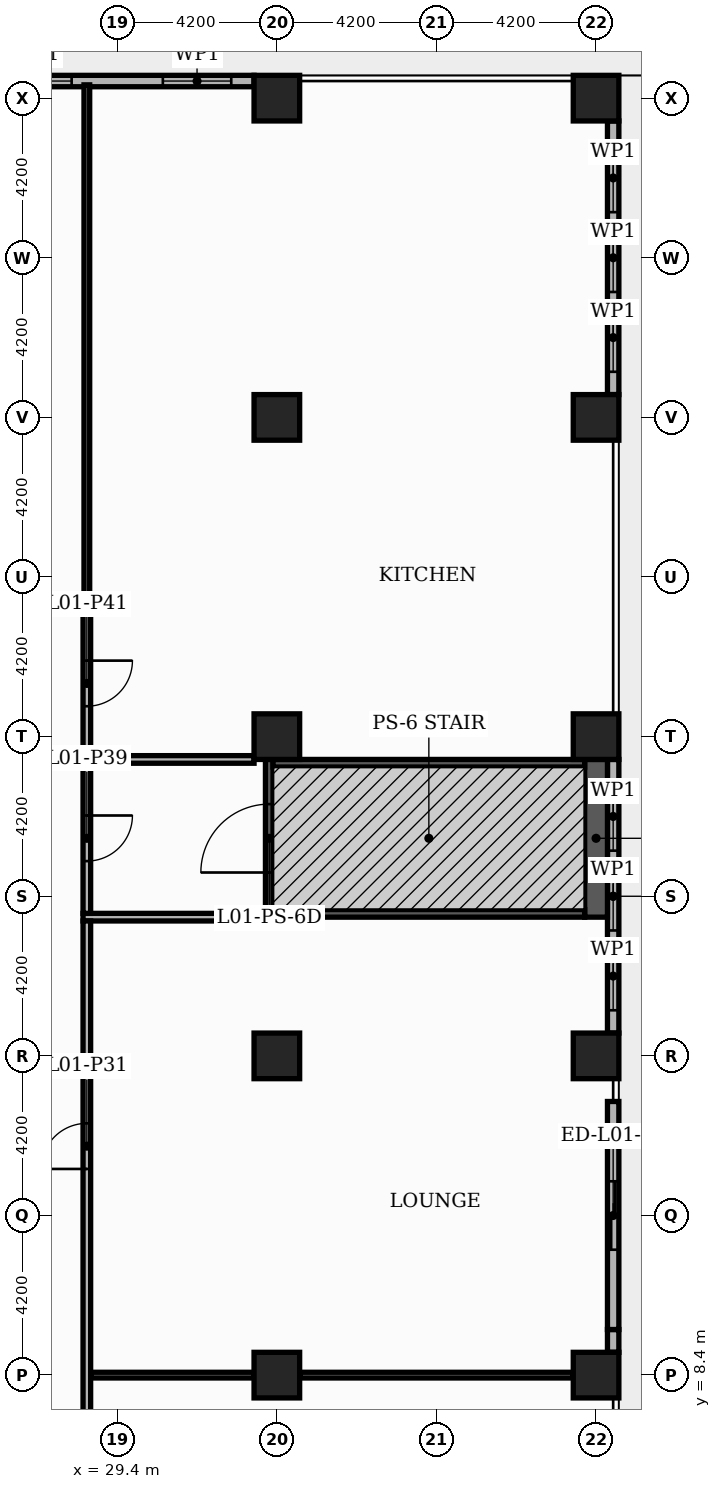
"""IFC4 building model, lengths in metres.
Left out: names, types, materials, properties, quantities, classifications, styles, units other than length and angle.
Written with IfcOpenShell. Run it as: python <this file> out.ifc"""

import sys

from ifc_helpers import new_model, si_unit, direction, frame, frame_2d, origin, origin_2d, place, context, subcontext, project, spatial, rectangle, extrude, element, fill, save


model = new_model("IFC4")
c1 = context("Model", 3, precision=1e-05, world=origin(), true_north=direction((0.0, 1.0)))
c2 = subcontext(c1, "Body", "Model", "MODEL_VIEW")
j1 = project(units=[si_unit("LENGTHUNIT", "METRE"), si_unit("PLANEANGLEUNIT", "RADIAN")], contexts=[c1])
p1 = place(None, origin())
s1 = spatial("IfcSite", under=j1, at=p1, CompositionType="ELEMENT")
p2 = place(p1, origin())
s2 = spatial("IfcBuilding", under=s1, at=p2, CompositionType="ELEMENT")
p3 = place(p2, frame((0.0, 0.0, 7.2)))
s3 = spatial("IfcBuildingStorey", under=s2, at=p3, CompositionType="ELEMENT", Elevation=7.2)
for number, where, z_axis, x_axis in (
    (1, (33.6, 8.4, 0.0), (0.0, 0.0, 1.0), (1.0, 0.0, 0.0)),
    (2, (33.6, 16.8, 0.0), (0.0, 0.0, 1.0), (1.0, 0.0, 0.0)),
    (3, (33.6, 25.2, 0.0), (0.0, 0.0, 1.0), (1.0, 0.0, 0.0)),
    (4, (33.6, 33.6, 0.0), (0.0, 0.0, 1.0), (1.0, 0.0, 0.0)),
    (5, (33.6, 42.0, 0.0), (0.0, 0.0, 1.0), (1.0, 0.0, 0.0)),
    (6, (42.0, 8.4, 0.0), (0.0, 0.0, 1.0), (1.0, 0.0, 0.0)),
    (7, (42.0, 16.8, 0.0), (0.0, 0.0, 1.0), (1.0, 0.0, 0.0)),
    (8, (42.0, 25.2, 0.0), (0.0, 0.0, 1.0), (1.0, 0.0, 0.0)),
    (9, (42.0, 33.6, 0.0), (0.0, 0.0, 1.0), (1.0, 0.0, 0.0)),
    (10, (42.0, 42.0, 0.0), (0.0, 0.0, 1.0), (1.0, 0.0, 0.0)),
):
    element("IfcColumn", number, at=place(p3, frame(where, z_axis=z_axis, x_axis=x_axis)), inside=s3, PredefinedType="COLUMN", context=c2, shape_type="SweptSolid", body=[
        extrude(rectangle(XDim=1.2, YDim=1.2, at=origin_2d()), origin(), (0.0, 0.0, 1.0), 4.8),
    ])
p4 = place(p3, frame((42.45, 9.0, 0.0), z_axis=(0.0, 0.0, 1.0), x_axis=(0.0, 1.0, 0.0)))
e11 = element("IfcWall", 11, at=p4, inside=s3, PredefinedType="STANDARD", context=c2, shape_type="SweptSolid", body=[
    extrude(rectangle(XDim=0.6, YDim=0.3, at=frame_2d((0.3, 0.0))), origin(), (0.0, 0.0, 1.0), 4.38),
])
p5 = place(p3, frame((42.45, 9.6, 0.0), z_axis=(0.0, 0.0, 1.0), x_axis=(0.0, 1.0, 0.0)))
e12 = element("IfcWall", 12, at=p5, inside=s3, PredefinedType="STANDARD", context=c2, shape_type="SweptSolid", body=[
    extrude(rectangle(XDim=6.0, YDim=0.3, at=frame_2d((3.0, 0.0))), origin(), (0.0, 0.0, 1.0), 4.38),
])
p6 = place(p5, frame((2.1, 0.0, 0.0)))
e13 = element("IfcOpeningElement", 13, at=p6, cuts=e12, PredefinedType="OPENING", context=c2, shape_type="SweptSolid", body=[
    extrude(rectangle(XDim=1.8, YDim=2.4, at=frame_2d((0.9, 1.2))), frame((0.0, 0.16, 0.0), z_axis=(0.0, -1.0, 0.0), x_axis=(1.0, 0.0, 0.0)), (0.0, 0.0, 1.0), 0.32),
])
p7 = place(p3, frame((42.45, 17.4, 0.0), z_axis=(0.0, 0.0, 1.0), x_axis=(0.0, 1.0, 0.0)))
e14 = element("IfcWall", 14, at=p7, inside=s3, PredefinedType="STANDARD", context=c2, shape_type="SweptSolid", body=[
    extrude(rectangle(XDim=7.2, YDim=0.3, at=frame_2d((3.6, 0.0))), origin(), (0.0, 0.0, 1.0), 4.38),
])
p8 = place(p7, frame((0.6, 0.0, 0.6)))
e15 = element("IfcOpeningElement", 15, at=p8, cuts=e14, PredefinedType="OPENING", context=c2, shape_type="SweptSolid", body=[
    extrude(rectangle(XDim=1.8, YDim=3.0, at=frame_2d((0.9, 1.5))), frame((0.0, 0.16, 0.0), z_axis=(0.0, -1.0, 0.0), x_axis=(1.0, 0.0, 0.0)), (0.0, 0.0, 1.0), 0.32),
])
p9 = place(p7, frame((2.7, 0.0, 0.6)))
e16 = element("IfcOpeningElement", 16, at=p9, cuts=e14, PredefinedType="OPENING", context=c2, shape_type="SweptSolid", body=[
    extrude(rectangle(XDim=1.8, YDim=3.0, at=frame_2d((0.9, 1.5))), frame((0.0, 0.16, 0.0), z_axis=(0.0, -1.0, 0.0), x_axis=(1.0, 0.0, 0.0)), (0.0, 0.0, 1.0), 0.32),
])
p10 = place(p7, frame((4.8, 0.0, 0.6)))
e17 = element("IfcOpeningElement", 17, at=p10, cuts=e14, PredefinedType="OPENING", context=c2, shape_type="SweptSolid", body=[
    extrude(rectangle(XDim=1.8, YDim=3.0, at=frame_2d((0.9, 1.5))), frame((0.0, 0.16, 0.0), z_axis=(0.0, -1.0, 0.0), x_axis=(1.0, 0.0, 0.0)), (0.0, 0.0, 1.0), 0.32),
])
p11 = place(p3, frame((42.45, 34.2, 0.0), z_axis=(0.0, 0.0, 1.0), x_axis=(0.0, 1.0, 0.0)))
e18 = element("IfcWall", 18, at=p11, inside=s3, PredefinedType="STANDARD", context=c2, shape_type="SweptSolid", body=[
    extrude(rectangle(XDim=7.2, YDim=0.3, at=frame_2d((3.6, 0.0))), origin(), (0.0, 0.0, 1.0), 4.38),
])
p12 = place(p11, frame((0.6, 0.0, 0.6)))
e19 = element("IfcOpeningElement", 19, at=p12, cuts=e18, PredefinedType="OPENING", context=c2, shape_type="SweptSolid", body=[
    extrude(rectangle(XDim=1.8, YDim=3.0, at=frame_2d((0.9, 1.5))), frame((0.0, 0.16, 0.0), z_axis=(0.0, -1.0, 0.0), x_axis=(1.0, 0.0, 0.0)), (0.0, 0.0, 1.0), 0.32),
])
p13 = place(p11, frame((2.7, 0.0, 0.6)))
e20 = element("IfcOpeningElement", 20, at=p13, cuts=e18, PredefinedType="OPENING", context=c2, shape_type="SweptSolid", body=[
    extrude(rectangle(XDim=1.8, YDim=3.0, at=frame_2d((0.9, 1.5))), frame((0.0, 0.16, 0.0), z_axis=(0.0, -1.0, 0.0), x_axis=(1.0, 0.0, 0.0)), (0.0, 0.0, 1.0), 0.32),
])
p14 = place(p11, frame((4.8, 0.0, 0.6)))
e21 = element("IfcOpeningElement", 21, at=p14, cuts=e18, PredefinedType="OPENING", context=c2, shape_type="SweptSolid", body=[
    extrude(rectangle(XDim=1.8, YDim=3.0, at=frame_2d((0.9, 1.5))), frame((0.0, 0.16, 0.0), z_axis=(0.0, -1.0, 0.0), x_axis=(1.0, 0.0, 0.0)), (0.0, 0.0, 1.0), 0.32),
])
p15 = place(p3, frame((33.0, 42.45, 0.0), z_axis=(0.0, 0.0, 1.0), x_axis=(-1.0, 0.0, 0.0)))
e22 = element("IfcWall", 22, at=p15, inside=s3, PredefinedType="STANDARD", context=c2, shape_type="SweptSolid", body=[
    extrude(rectangle(XDim=7.2, YDim=0.3, at=frame_2d((3.6, 0.0))), origin(), (0.0, 0.0, 1.0), 4.38),
])
p16 = place(p15, frame((0.6, 0.0, 0.6)))
e23 = element("IfcOpeningElement", 23, at=p16, cuts=e22, PredefinedType="OPENING", context=c2, shape_type="SweptSolid", body=[
    extrude(rectangle(XDim=1.8, YDim=3.0, at=frame_2d((0.9, 1.5))), frame((0.0, 0.16, 0.0), z_axis=(0.0, -1.0, 0.0), x_axis=(1.0, 0.0, 0.0)), (0.0, 0.0, 1.0), 0.32),
])
p17 = place(p15, frame((4.8, 0.0, 0.6)))
e24 = element("IfcOpeningElement", 24, at=p17, cuts=e22, PredefinedType="OPENING", context=c2, shape_type="SweptSolid", body=[
    extrude(rectangle(XDim=1.8, YDim=3.0, at=frame_2d((0.9, 1.5))), frame((0.0, 0.16, 0.0), z_axis=(0.0, -1.0, 0.0), x_axis=(1.0, 0.0, 0.0)), (0.0, 0.0, 1.0), 0.32),
])
p18 = place(p3, frame((28.7, 8.4, 0.0), z_axis=(0.0, 0.0, 1.0), x_axis=(1.0, 0.0, 0.0)))
e25 = element("IfcWall", 25, at=p18, inside=s3, PredefinedType="PARTITIONING", context=c2, shape_type="SweptSolid", body=[
    extrude(rectangle(XDim=4.3, YDim=0.15, at=frame_2d((2.15, 0.0))), origin(), (0.0, 0.0, 1.0), 4.08),
])
p19 = place(p3, frame((34.2, 8.4, 0.0), z_axis=(0.0, 0.0, 1.0), x_axis=(1.0, 0.0, 0.0)))
e26 = element("IfcWall", 26, at=p19, inside=s3, PredefinedType="PARTITIONING", context=c2, shape_type="SweptSolid", body=[
    extrude(rectangle(XDim=7.2, YDim=0.15, at=frame_2d((3.6, 0.0))), origin(), (0.0, 0.0, 1.0), 4.08),
])
p20 = place(p3, frame((28.5, 20.45, 0.0), z_axis=(0.0, 0.0, 1.0), x_axis=(1.0, 0.0, 0.0)))
e27 = element("IfcWall", 27, at=p20, inside=s3, PredefinedType="PARTITIONING", context=c2, shape_type="SweptSolid", body=[
    extrude(rectangle(XDim=4.8, YDim=0.2, at=frame_2d((2.4, 0.0))), origin(), (0.0, 0.0, 1.0), 4.38),
])
p21 = place(p3, frame((28.5, 24.6, 0.0), z_axis=(0.0, 0.0, 1.0), x_axis=(1.0, 0.0, 0.0)))
e28 = element("IfcWall", 28, at=p21, inside=s3, PredefinedType="PARTITIONING", context=c2, shape_type="SweptSolid", body=[
    extrude(rectangle(XDim=4.5, YDim=0.2, at=frame_2d((2.25, 0.0))), origin(), (0.0, 0.0, 1.0), 4.38),
])
p22 = place(p3, frame((-28.7, 28.6, 0.0), z_axis=(0.0, 0.0, 1.0), x_axis=(1.0, 0.0, 0.0)))
e29 = element("IfcWall", 29, at=p22, inside=s3, PredefinedType="PARTITIONING", context=c2, shape_type="SweptSolid", body=[
    extrude(rectangle(XDim=57.4, YDim=0.2, at=frame_2d((28.7, 0.0))), origin(), (0.0, 0.0, 1.0), 3.98),
])
p23 = place(p22, frame((9.6, 0.0, 0.0)))
e30 = element("IfcOpeningElement", 30, at=p23, cuts=e29, PredefinedType="OPENING", context=c2, shape_type="SweptSolid", body=[
    extrude(rectangle(XDim=1.2, YDim=2.2, at=frame_2d((0.6, 1.1))), frame((0.0, 0.11, 0.0), z_axis=(0.0, -1.0, 0.0), x_axis=(1.0, 0.0, 0.0)), (0.0, 0.0, 1.0), 0.22),
])
p24 = place(p22, frame((28.1, 0.0, 0.0)))
e31 = element("IfcOpeningElement", 31, at=p24, cuts=e29, PredefinedType="OPENING", context=c2, shape_type="SweptSolid", body=[
    extrude(rectangle(XDim=1.2, YDim=2.2, at=frame_2d((0.6, 1.1))), frame((0.0, 0.11, 0.0), z_axis=(0.0, -1.0, 0.0), x_axis=(1.0, 0.0, 0.0)), (0.0, 0.0, 1.0), 0.22),
])
p25 = place(p22, frame((46.6, 0.0, 0.0)))
e32 = element("IfcOpeningElement", 32, at=p25, cuts=e29, PredefinedType="OPENING", context=c2, shape_type="SweptSolid", body=[
    extrude(rectangle(XDim=1.2, YDim=2.2, at=frame_2d((0.6, 1.1))), frame((0.0, 0.11, 0.0), z_axis=(0.0, -1.0, 0.0), x_axis=(1.0, 0.0, 0.0)), (0.0, 0.0, 1.0), 0.22),
])
p26 = place(p3, frame((28.6, -20.35, 0.0), z_axis=(0.0, 0.0, 1.0), x_axis=(0.0, 1.0, 0.0)))
e33 = element("IfcWall", 33, at=p26, inside=s3, PredefinedType="PARTITIONING", context=c2, shape_type="SweptSolid", body=[
    extrude(rectangle(XDim=40.7, YDim=0.2, at=frame_2d((20.35, 0.0))), origin(), (0.0, 0.0, 1.0), 4.08),
])
p27 = place(p26, frame((5.325, 0.0, 0.0)))
e34 = element("IfcOpeningElement", 34, at=p27, cuts=e33, PredefinedType="OPENING", context=c2, shape_type="SweptSolid", body=[
    extrude(rectangle(XDim=1.2, YDim=2.2, at=frame_2d((0.6, 1.1))), frame((0.0, 0.11, 0.0), z_axis=(0.0, -1.0, 0.0), x_axis=(1.0, 0.0, 0.0)), (0.0, 0.0, 1.0), 0.22),
])
p28 = place(p26, frame((19.75, 0.0, 0.0)))
e35 = element("IfcOpeningElement", 35, at=p28, cuts=e33, PredefinedType="OPENING", context=c2, shape_type="SweptSolid", body=[
    extrude(rectangle(XDim=1.2, YDim=2.2, at=frame_2d((0.6, 1.1))), frame((0.0, 0.11, 0.0), z_axis=(0.0, -1.0, 0.0), x_axis=(1.0, 0.0, 0.0)), (0.0, 0.0, 1.0), 0.22),
])
p29 = place(p26, frame((34.175, 0.0, 0.0)))
e36 = element("IfcOpeningElement", 36, at=p29, cuts=e33, PredefinedType="OPENING", context=c2, shape_type="SweptSolid", body=[
    extrude(rectangle(XDim=1.2, YDim=2.2, at=frame_2d((0.6, 1.1))), frame((0.0, 0.11, 0.0), z_axis=(0.0, -1.0, 0.0), x_axis=(1.0, 0.0, 0.0)), (0.0, 0.0, 1.0), 0.22),
])
p30 = place(p3, frame((28.6, 20.55, 0.0), z_axis=(0.0, 0.0, 1.0), x_axis=(0.0, 1.0, 0.0)))
e37 = element("IfcWall", 37, at=p30, inside=s3, PredefinedType="PARTITIONING", context=c2, shape_type="SweptSolid", body=[
    extrude(rectangle(XDim=3.95, YDim=0.2, at=frame_2d((1.975, 0.0))), origin(), (0.0, 0.0, 1.0), 4.38),
])
p31 = place(p30, frame((1.375, 0.0, 0.0)))
e38 = element("IfcOpeningElement", 38, at=p31, cuts=e37, PredefinedType="OPENING", context=c2, shape_type="SweptSolid", body=[
    extrude(rectangle(XDim=1.2, YDim=2.2, at=frame_2d((0.6, 1.1))), frame((0.0, 0.11, 0.0), z_axis=(0.0, -1.0, 0.0), x_axis=(1.0, 0.0, 0.0)), (0.0, 0.0, 1.0), 0.22),
])
p32 = place(p3, frame((28.6, 24.7, 0.0), z_axis=(0.0, 0.0, 1.0), x_axis=(0.0, 1.0, 0.0)))
e39 = element("IfcWall", 39, at=p32, inside=s3, PredefinedType="PARTITIONING", context=c2, shape_type="SweptSolid", body=[
    extrude(rectangle(XDim=3.8, YDim=0.2, at=frame_2d((1.9, 0.0))), origin(), (0.0, 0.0, 1.0), 4.08),
])
p33 = place(p32, frame((1.3, 0.0, 0.0)))
e40 = element("IfcOpeningElement", 40, at=p33, cuts=e39, PredefinedType="OPENING", context=c2, shape_type="SweptSolid", body=[
    extrude(rectangle(XDim=1.2, YDim=2.2, at=frame_2d((0.6, 1.1))), frame((0.0, 0.11, 0.0), z_axis=(0.0, -1.0, 0.0), x_axis=(1.0, 0.0, 0.0)), (0.0, 0.0, 1.0), 0.22),
])
p34 = place(p3, frame((28.6, 28.7, 0.0), z_axis=(0.0, 0.0, 1.0), x_axis=(0.0, 1.0, 0.0)))
e41 = element("IfcWall", 41, at=p34, inside=s3, PredefinedType="PARTITIONING", context=c2, shape_type="SweptSolid", body=[
    extrude(rectangle(XDim=13.65, YDim=0.15, at=frame_2d((6.825, 0.0))), origin(), (0.0, 0.0, 1.0), 4.08),
])
p35 = place(p3, frame((33.4, 20.45, 0.0), z_axis=(0.0, 0.0, 1.0), x_axis=(0.0, 1.0, 0.0)))
e42 = element("IfcWall", 42, at=p35, inside=s3, PredefinedType="SOLIDWALL", context=c2, shape_type="SweptSolid", body=[
    extrude(rectangle(XDim=4.15, YDim=0.2, at=frame_2d((2.075, 0.0))), origin(), (0.0, 0.0, 1.0), 3.98),
])
p36 = place(p35, frame((1.175, 0.0, 0.0)))
e43 = element("IfcOpeningElement", 43, at=p36, cuts=e42, PredefinedType="OPENING", context=c2, shape_type="SweptSolid", body=[
    extrude(rectangle(XDim=1.8, YDim=2.2, at=frame_2d((0.9, 1.1))), frame((0.0, 0.11, 0.0), z_axis=(0.0, -1.0, 0.0), x_axis=(1.0, 0.0, 0.0)), (0.0, 0.0, 1.0), 0.22),
])
p37 = place(p3, frame((42.0, 20.45, 0.0), z_axis=(0.0, 0.0, 1.0), x_axis=(0.0, 1.0, 0.0)))
e44 = element("IfcWall", 44, at=p37, inside=s3, PredefinedType="SOLIDWALL", context=c2, shape_type="SweptSolid", body=[
    extrude(rectangle(XDim=4.15, YDim=0.6, at=frame_2d((2.075, 0.0))), origin(), (0.0, 0.0, 1.0), 3.98),
])
for number, where, z_axis, x_axis in (
    (45, (33.5, 20.55, 0.0), (0.0, 0.0, 1.0), (1.0, 0.0, 0.0)),
    (46, (33.5, 24.5, 0.0), (0.0, 0.0, 1.0), (1.0, 0.0, 0.0)),
):
    element("IfcWall", number, at=place(p3, frame(where, z_axis=z_axis, x_axis=x_axis)), inside=s3, PredefinedType="SOLIDWALL", context=c2, shape_type="SweptSolid", body=[
        extrude(rectangle(XDim=8.2, YDim=0.2, at=frame_2d((4.1, 0.0))), origin(), (0.0, 0.0, 1.0), 4.6),
    ])
p38 = place(p6, origin())
e47 = element("IfcDoor", 47, at=p38, inside=s3, OperationType="SLIDING_TO_RIGHT", PredefinedType="DOOR", context=c2, shape_type="SweptSolid", body=[
    extrude(rectangle(XDim=1.8, YDim=2.4, at=frame_2d((0.9, 1.2))), frame((0.0, 0.025, 0.0), z_axis=(0.0, -1.0, 0.0), x_axis=(1.0, 0.0, 0.0)), (0.0, 0.0, 1.0), 0.05),
])
fill(e13, e47)
p39 = place(p8, origin())
e48 = element("IfcWindow", 48, at=p39, inside=s3, PartitioningType="SINGLE_PANEL", PredefinedType="WINDOW", context=c2, shape_type="SweptSolid", body=[
    extrude(rectangle(XDim=1.8, YDim=3.0, at=frame_2d((0.9, 1.5))), frame((0.0, 0.03, 0.0), z_axis=(0.0, -1.0, 0.0), x_axis=(1.0, 0.0, 0.0)), (0.0, 0.0, 1.0), 0.06),
])
fill(e15, e48)
p40 = place(p9, origin())
e49 = element("IfcWindow", 49, at=p40, inside=s3, PartitioningType="SINGLE_PANEL", PredefinedType="WINDOW", context=c2, shape_type="SweptSolid", body=[
    extrude(rectangle(XDim=1.8, YDim=3.0, at=frame_2d((0.9, 1.5))), frame((0.0, 0.03, 0.0), z_axis=(0.0, -1.0, 0.0), x_axis=(1.0, 0.0, 0.0)), (0.0, 0.0, 1.0), 0.06),
])
fill(e16, e49)
p41 = place(p10, origin())
e50 = element("IfcWindow", 50, at=p41, inside=s3, PartitioningType="SINGLE_PANEL", PredefinedType="WINDOW", context=c2, shape_type="SweptSolid", body=[
    extrude(rectangle(XDim=1.8, YDim=3.0, at=frame_2d((0.9, 1.5))), frame((0.0, 0.03, 0.0), z_axis=(0.0, -1.0, 0.0), x_axis=(1.0, 0.0, 0.0)), (0.0, 0.0, 1.0), 0.06),
])
fill(e17, e50)
p42 = place(p12, origin())
e51 = element("IfcWindow", 51, at=p42, inside=s3, PartitioningType="SINGLE_PANEL", PredefinedType="WINDOW", context=c2, shape_type="SweptSolid", body=[
    extrude(rectangle(XDim=1.8, YDim=3.0, at=frame_2d((0.9, 1.5))), frame((0.0, 0.03, 0.0), z_axis=(0.0, -1.0, 0.0), x_axis=(1.0, 0.0, 0.0)), (0.0, 0.0, 1.0), 0.06),
])
fill(e19, e51)
p43 = place(p13, origin())
e52 = element("IfcWindow", 52, at=p43, inside=s3, PartitioningType="SINGLE_PANEL", PredefinedType="WINDOW", context=c2, shape_type="SweptSolid", body=[
    extrude(rectangle(XDim=1.8, YDim=3.0, at=frame_2d((0.9, 1.5))), frame((0.0, 0.03, 0.0), z_axis=(0.0, -1.0, 0.0), x_axis=(1.0, 0.0, 0.0)), (0.0, 0.0, 1.0), 0.06),
])
fill(e20, e52)
p44 = place(p14, origin())
e53 = element("IfcWindow", 53, at=p44, inside=s3, PartitioningType="SINGLE_PANEL", PredefinedType="WINDOW", context=c2, shape_type="SweptSolid", body=[
    extrude(rectangle(XDim=1.8, YDim=3.0, at=frame_2d((0.9, 1.5))), frame((0.0, 0.03, 0.0), z_axis=(0.0, -1.0, 0.0), x_axis=(1.0, 0.0, 0.0)), (0.0, 0.0, 1.0), 0.06),
])
fill(e21, e53)
p45 = place(p16, origin())
e54 = element("IfcWindow", 54, at=p45, inside=s3, PartitioningType="SINGLE_PANEL", PredefinedType="WINDOW", context=c2, shape_type="SweptSolid", body=[
    extrude(rectangle(XDim=1.8, YDim=3.0, at=frame_2d((0.9, 1.5))), frame((0.0, 0.03, 0.0), z_axis=(0.0, -1.0, 0.0), x_axis=(1.0, 0.0, 0.0)), (0.0, 0.0, 1.0), 0.06),
])
fill(e23, e54)
p46 = place(p17, origin())
e55 = element("IfcWindow", 55, at=p46, inside=s3, PartitioningType="SINGLE_PANEL", PredefinedType="WINDOW", context=c2, shape_type="SweptSolid", body=[
    extrude(rectangle(XDim=1.8, YDim=3.0, at=frame_2d((0.9, 1.5))), frame((0.0, 0.03, 0.0), z_axis=(0.0, -1.0, 0.0), x_axis=(1.0, 0.0, 0.0)), (0.0, 0.0, 1.0), 0.06),
])
fill(e24, e55)
p47 = place(p29, origin())
e56 = element("IfcDoor", 56, at=p47, inside=s3, OperationType="SINGLE_SWING_LEFT", PredefinedType="DOOR", context=c2, shape_type="SweptSolid", body=[
    extrude(rectangle(XDim=1.2, YDim=2.2, at=frame_2d((0.6, 1.1))), frame((0.0, 0.025, 0.0), z_axis=(0.0, -1.0, 0.0), x_axis=(1.0, 0.0, 0.0)), (0.0, 0.0, 1.0), 0.05),
])
fill(e36, e56)
p48 = place(p31, origin())
e57 = element("IfcDoor", 57, at=p48, inside=s3, OperationType="SINGLE_SWING_RIGHT", PredefinedType="DOOR", context=c2, shape_type="SweptSolid", body=[
    extrude(rectangle(XDim=1.2, YDim=2.2, at=frame_2d((0.6, 1.1))), frame((0.0, 0.025, 0.0), z_axis=(0.0, -1.0, 0.0), x_axis=(1.0, 0.0, 0.0)), (0.0, 0.0, 1.0), 0.05),
])
fill(e38, e57)
p49 = place(p33, origin())
e58 = element("IfcDoor", 58, at=p49, inside=s3, OperationType="SINGLE_SWING_RIGHT", PredefinedType="DOOR", context=c2, shape_type="SweptSolid", body=[
    extrude(rectangle(XDim=1.2, YDim=2.2, at=frame_2d((0.6, 1.1))), frame((0.0, 0.025, 0.0), z_axis=(0.0, -1.0, 0.0), x_axis=(1.0, 0.0, 0.0)), (0.0, 0.0, 1.0), 0.05),
])
fill(e40, e58)
p50 = place(p36, origin())
e59 = element("IfcDoor", 59, at=p50, inside=s3, OperationType="DOUBLE_DOOR_SINGLE_SWING", PredefinedType="DOOR", context=c2, shape_type="SweptSolid", body=[
    extrude(rectangle(XDim=1.8, YDim=2.2, at=frame_2d((0.9, 1.1))), frame((0.0, 0.025, 0.0), z_axis=(0.0, -1.0, 0.0), x_axis=(1.0, 0.0, 0.0)), (0.0, 0.0, 1.0), 0.05),
])
fill(e43, e59)
save(model, sys.argv[1])
